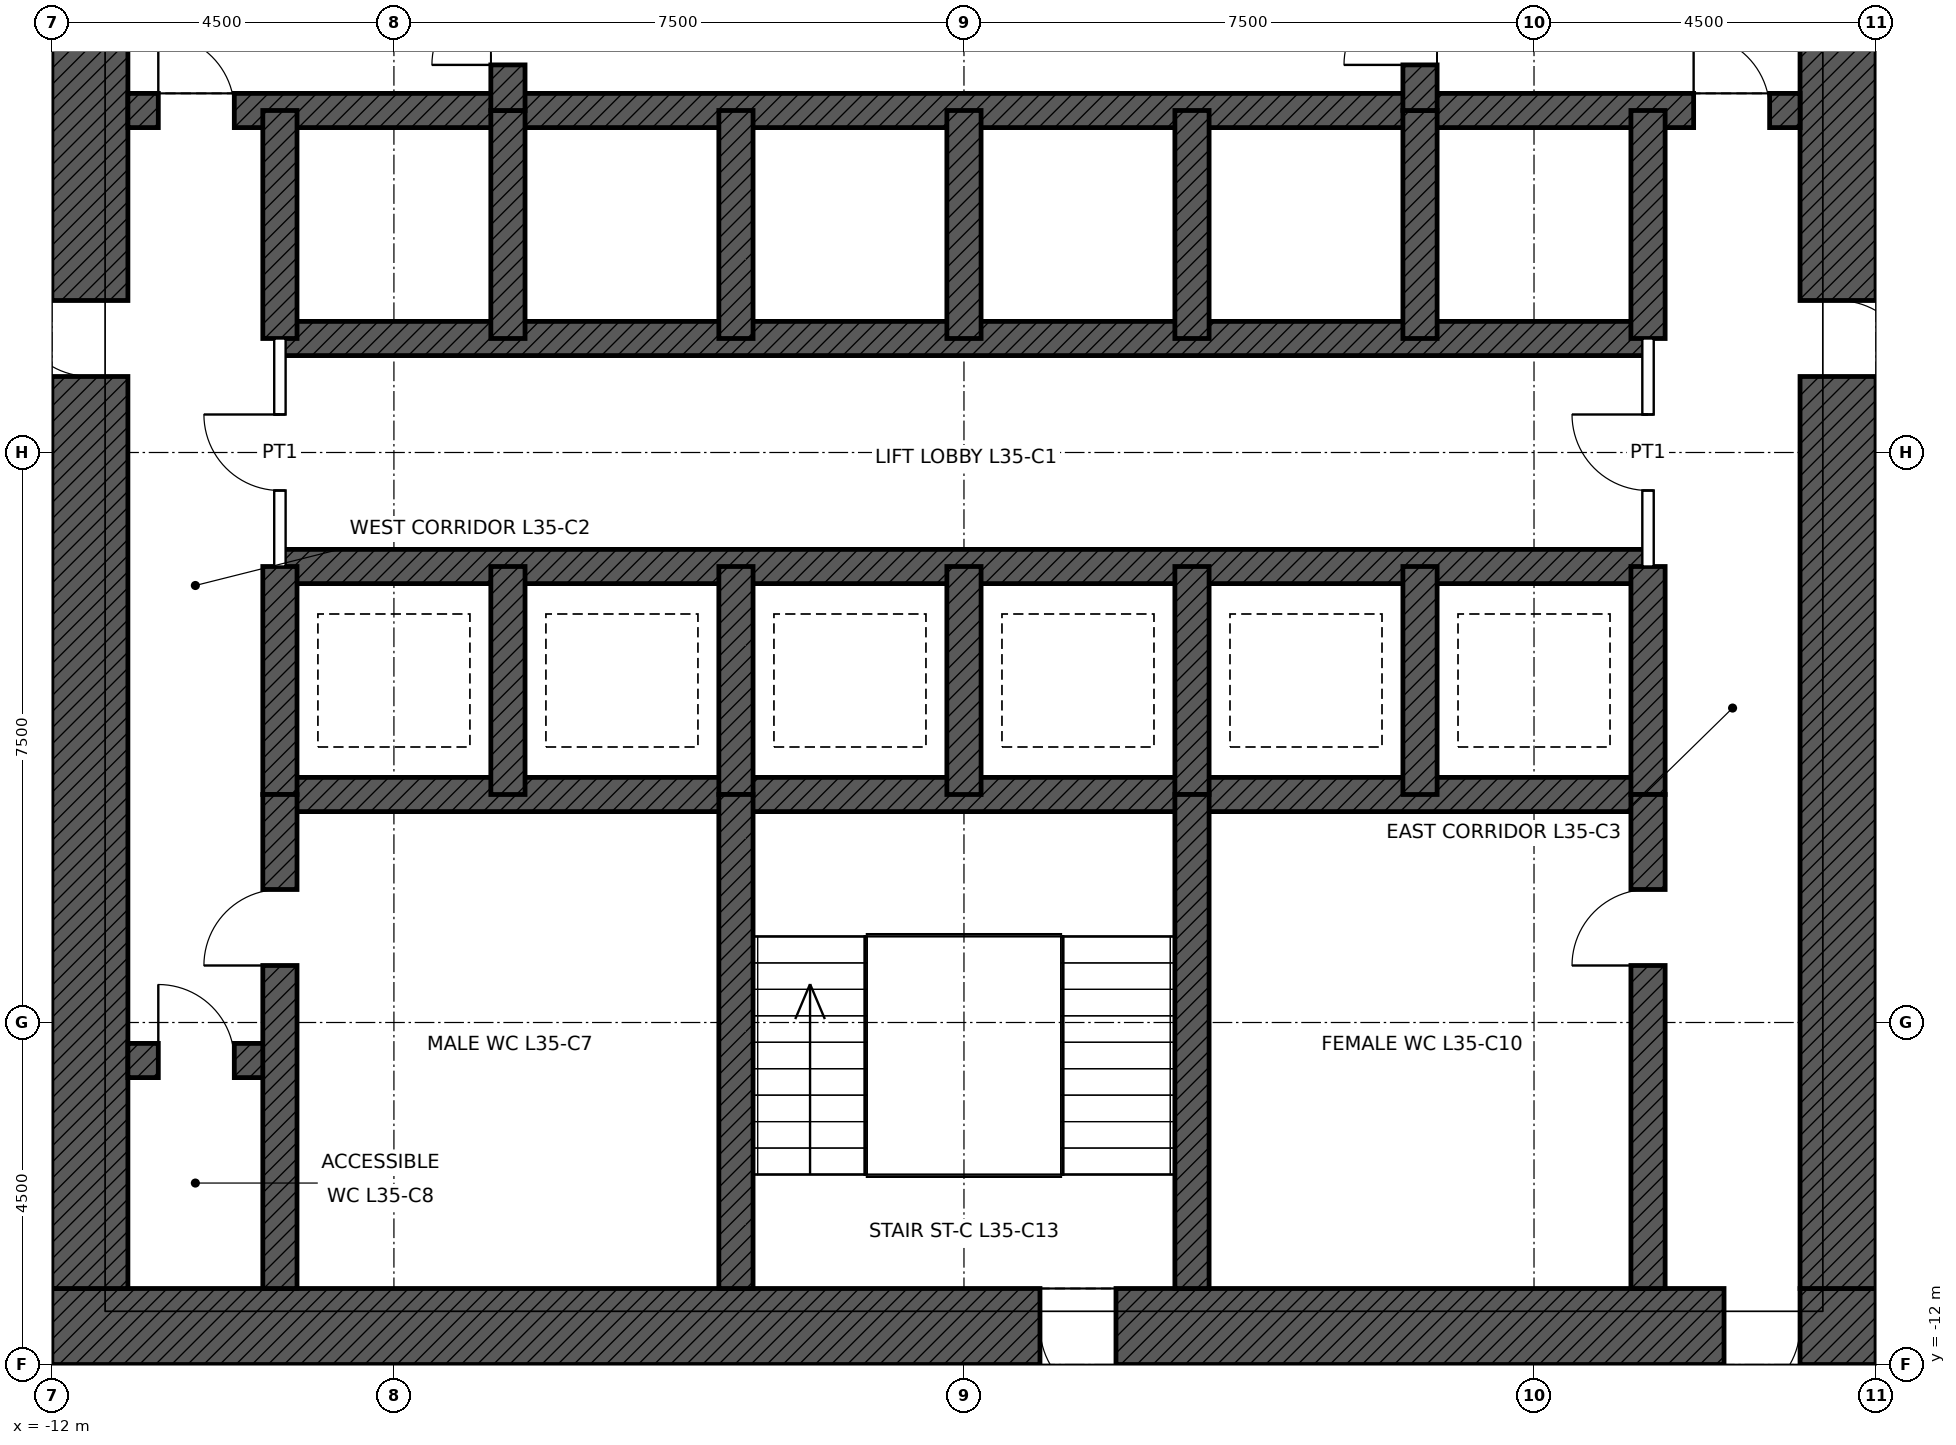
"""IFC4 building model, lengths in metres.
Left out: names, types, materials, properties, quantities, classifications, styles, units other than length and angle.
Written with IfcOpenShell. Run it as: python <this file> out.ifc"""

import sys

from ifc_helpers import new_model, si_unit, direction, frame, frame_2d, origin, place, context, subcontext, project, spatial, rectangle, extrude, element, fill, save


model = new_model("IFC4")
c1 = context("Model", 3, precision=1e-05, world=origin(), true_north=direction((0.0, 1.0)))
c2 = subcontext(c1, "Body", "Model", "MODEL_VIEW")
j1 = project(units=[si_unit("LENGTHUNIT", "METRE"), si_unit("PLANEANGLEUNIT", "RADIAN")], contexts=[c1])
p1 = place(None, origin())
s1 = spatial("IfcSite", under=j1, at=p1, CompositionType="ELEMENT")
p2 = place(p1, origin())
s2 = spatial("IfcBuilding", under=s1, at=p2, CompositionType="ELEMENT")
p3 = place(p2, frame((0.0, 0.0, 171.9)))
s3 = spatial("IfcBuildingStorey", under=s2, at=p3, CompositionType="ELEMENT", Elevation=171.9)
p4 = place(p3, frame((12.0, -11.5, 0.0), z_axis=(0.0, 0.0, 1.0), x_axis=(-1.0, 0.0, 0.0)))
e1 = element("IfcWall", 1, at=p4, inside=s3, PredefinedType="SHEAR", context=c2, shape_type="SweptSolid", body=[
    extrude(rectangle(XDim=24.0, YDim=1.0, at=frame_2d((12.0, 0.0))), origin(), (0.0, 0.0, 1.0), 6.0),
])
p5 = place(p4, frame((10.0, 0.0, 0.0)))
e2 = element("IfcOpeningElement", 2, at=p5, cuts=e1, PredefinedType="OPENING", context=c2, shape_type="SweptSolid", body=[
    extrude(rectangle(XDim=1.0, YDim=2.1, at=frame_2d((0.5, 1.05))), frame((0.0, 0.51, 0.0), z_axis=(0.0, -1.0, 0.0), x_axis=(1.0, 0.0, 0.0)), (0.0, 0.0, 1.0), 1.02),
])
p6 = place(p4, frame((1.0, 0.0, 0.0)))
e3 = element("IfcOpeningElement", 3, at=p6, cuts=e1, PredefinedType="OPENING", context=c2, shape_type="SweptSolid", body=[
    extrude(rectangle(XDim=1.0, YDim=2.4, at=frame_2d((0.5, 1.2))), frame((0.0, 0.51, 0.0), z_axis=(0.0, -1.0, 0.0), x_axis=(1.0, 0.0, 0.0)), (0.0, 0.0, 1.0), 1.02),
])
p7 = place(p3, frame((11.5, 11.0, 0.0), z_axis=(0.0, 0.0, 1.0), x_axis=(0.0, -1.0, 0.0)))
e4 = element("IfcWall", 4, at=p7, inside=s3, PredefinedType="SHEAR", context=c2, shape_type="SweptSolid", body=[
    extrude(rectangle(XDim=22.0, YDim=1.0, at=frame_2d((11.0, 0.0))), origin(), (0.0, 0.0, 1.0), 6.0),
])
p8 = place(p7, frame((9.0, 0.0, 0.0)))
e5 = element("IfcOpeningElement", 5, at=p8, cuts=e4, PredefinedType="OPENING", context=c2, shape_type="SweptSolid", body=[
    extrude(rectangle(XDim=1.0, YDim=2.4, at=frame_2d((0.5, 1.2))), frame((0.0, 0.51, 0.0), z_axis=(0.0, -1.0, 0.0), x_axis=(1.0, 0.0, 0.0)), (0.0, 0.0, 1.0), 1.02),
])
p9 = place(p3, frame((-11.5, -11.0, 0.0), z_axis=(0.0, 0.0, 1.0), x_axis=(0.0, 1.0, 0.0)))
e6 = element("IfcWall", 6, at=p9, inside=s3, PredefinedType="SHEAR", context=c2, shape_type="SweptSolid", body=[
    extrude(rectangle(XDim=22.0, YDim=1.0, at=frame_2d((11.0, 0.0))), origin(), (0.0, 0.0, 1.0), 6.0),
])
p10 = place(p9, frame((12.0, 0.0, 0.0)))
e7 = element("IfcOpeningElement", 7, at=p10, cuts=e6, PredefinedType="OPENING", context=c2, shape_type="SweptSolid", body=[
    extrude(rectangle(XDim=1.0, YDim=2.4, at=frame_2d((0.5, 1.2))), frame((0.0, 0.51, 0.0), z_axis=(0.0, -1.0, 0.0), x_axis=(1.0, 0.0, 0.0)), (0.0, 0.0, 1.0), 1.02),
])
p11 = place(p3, frame((-11.0, 4.5, 0.0), z_axis=(0.0, 0.0, 1.0), x_axis=(1.0, 0.0, 0.0)))
e8 = element("IfcWall", 8, at=p11, inside=s3, PredefinedType="SHEAR", context=c2, shape_type="SweptSolid", body=[
    extrude(rectangle(XDim=22.0, YDim=0.45, at=frame_2d((11.0, 0.0))), origin(), (0.0, 0.0, 1.0), 6.0),
])
p12 = place(p11, frame((0.4, 0.0, 0.0)))
e9 = element("IfcOpeningElement", 9, at=p12, cuts=e8, PredefinedType="OPENING", context=c2, shape_type="SweptSolid", body=[
    extrude(rectangle(XDim=1.0, YDim=2.1, at=frame_2d((0.5, 1.05))), frame((0.0, 0.235, 0.0), z_axis=(0.0, -1.0, 0.0), x_axis=(1.0, 0.0, 0.0)), (0.0, 0.0, 1.0), 0.47),
])
p13 = place(p11, frame((20.6, 0.0, 0.0)))
e10 = element("IfcOpeningElement", 10, at=p13, cuts=e8, PredefinedType="OPENING", context=c2, shape_type="SweptSolid", body=[
    extrude(rectangle(XDim=1.0, YDim=2.1, at=frame_2d((0.5, 1.05))), frame((0.0, 0.235, 0.0), z_axis=(0.0, -1.0, 0.0), x_axis=(1.0, 0.0, 0.0)), (0.0, 0.0, 1.0), 0.47),
])
for number, where, z_axis, x_axis in (
    (11, (-9.0, 1.5, 0.0), (0.0, 0.0, 1.0), (1.0, 0.0, 0.0)),
    (12, (-9.0, -1.5, 0.0), (0.0, 0.0, 1.0), (1.0, 0.0, 0.0)),
    (13, (-9.0, -4.5, 0.0), (0.0, 0.0, 1.0), (1.0, 0.0, 0.0)),
):
    element("IfcWall", number, at=place(p3, frame(where, z_axis=z_axis, x_axis=x_axis)), inside=s3, PredefinedType="SHEAR", context=c2, shape_type="SweptSolid", body=[
        extrude(rectangle(XDim=18.0, YDim=0.45, at=frame_2d((9.0, 0.0))), origin(), (0.0, 0.0, 1.0), 6.0),
    ])
p14 = place(p3, frame((-11.0, -8.0, 0.0), z_axis=(0.0, 0.0, 1.0), x_axis=(1.0, 0.0, 0.0)))
e14 = element("IfcWall", 14, at=p14, inside=s3, PredefinedType="SHEAR", context=c2, shape_type="SweptSolid", body=[
    extrude(rectangle(XDim=2.0, YDim=0.45, at=frame_2d((1.0, 0.0))), origin(), (0.0, 0.0, 1.0), 6.0),
])
p15 = place(p14, frame((0.4, 0.0, 0.0)))
e15 = element("IfcOpeningElement", 15, at=p15, cuts=e14, PredefinedType="OPENING", context=c2, shape_type="SweptSolid", body=[
    extrude(rectangle(XDim=1.0, YDim=2.1, at=frame_2d((0.5, 1.05))), frame((0.0, 0.235, 0.0), z_axis=(0.0, -1.0, 0.0), x_axis=(1.0, 0.0, 0.0)), (0.0, 0.0, 1.0), 0.47),
])
for number, where, z_axis, x_axis in (
    (16, (-9.0, 1.5, 0.0), (0.0, 0.0, 1.0), (0.0, 1.0, 0.0)),
    (17, (9.0, 1.5, 0.0), (0.0, 0.0, 1.0), (0.0, 1.0, 0.0)),
    (18, (-9.0, -4.5, 0.0), (0.0, 0.0, 1.0), (0.0, 1.0, 0.0)),
    (19, (9.0, -4.5, 0.0), (0.0, 0.0, 1.0), (0.0, 1.0, 0.0)),
    (20, (-6.0, 1.5, 0.0), (0.0, 0.0, 1.0), (0.0, 1.0, 0.0)),
    (21, (-3.0, 1.5, 0.0), (0.0, 0.0, 1.0), (0.0, 1.0, 0.0)),
    (22, (0.0, 1.5, 0.0), (0.0, 0.0, 1.0), (0.0, 1.0, 0.0)),
    (23, (3.0, 1.5, 0.0), (0.0, 0.0, 1.0), (0.0, 1.0, 0.0)),
    (24, (6.0, 1.5, 0.0), (0.0, 0.0, 1.0), (0.0, 1.0, 0.0)),
    (25, (-6.0, -4.5, 0.0), (0.0, 0.0, 1.0), (0.0, 1.0, 0.0)),
    (26, (-3.0, -4.5, 0.0), (0.0, 0.0, 1.0), (0.0, 1.0, 0.0)),
    (27, (0.0, -4.5, 0.0), (0.0, 0.0, 1.0), (0.0, 1.0, 0.0)),
    (28, (3.0, -4.5, 0.0), (0.0, 0.0, 1.0), (0.0, 1.0, 0.0)),
    (29, (6.0, -4.5, 0.0), (0.0, 0.0, 1.0), (0.0, 1.0, 0.0)),
):
    element("IfcWall", number, at=place(p3, frame(where, z_axis=z_axis, x_axis=x_axis)), inside=s3, PredefinedType="SHEAR", context=c2, shape_type="SweptSolid", body=[
        extrude(rectangle(XDim=3.0, YDim=0.45, at=frame_2d((1.5, 0.0))), origin(), (0.0, 0.0, 1.0), 6.0),
    ])
p16 = place(p3, frame((-6.0, 4.5, 0.0), z_axis=(0.0, 0.0, 1.0), x_axis=(0.0, 1.0, 0.0)))
e30 = element("IfcWall", 30, at=p16, inside=s3, PredefinedType="SHEAR", context=c2, shape_type="SweptSolid", body=[
    extrude(rectangle(XDim=6.5, YDim=0.45, at=frame_2d((3.25, 0.0))), origin(), (0.0, 0.0, 1.0), 6.0),
])
p17 = place(p16, frame((0.6, 0.0, 0.0)))
e31 = element("IfcOpeningElement", 31, at=p17, cuts=e30, PredefinedType="OPENING", context=c2, shape_type="SweptSolid", body=[
    extrude(rectangle(XDim=1.0, YDim=2.1, at=frame_2d((0.5, 1.05))), frame((0.0, 0.235, 0.0), z_axis=(0.0, -1.0, 0.0), x_axis=(1.0, 0.0, 0.0)), (0.0, 0.0, 1.0), 0.47),
])
p18 = place(p3, frame((6.0, 4.5, 0.0), z_axis=(0.0, 0.0, 1.0), x_axis=(0.0, 1.0, 0.0)))
e32 = element("IfcWall", 32, at=p18, inside=s3, PredefinedType="SHEAR", context=c2, shape_type="SweptSolid", body=[
    extrude(rectangle(XDim=6.5, YDim=0.45, at=frame_2d((3.25, 0.0))), origin(), (0.0, 0.0, 1.0), 6.0),
])
p19 = place(p18, frame((0.6, 0.0, 0.0)))
e33 = element("IfcOpeningElement", 33, at=p19, cuts=e32, PredefinedType="OPENING", context=c2, shape_type="SweptSolid", body=[
    extrude(rectangle(XDim=1.0, YDim=2.1, at=frame_2d((0.5, 1.05))), frame((0.0, 0.235, 0.0), z_axis=(0.0, -1.0, 0.0), x_axis=(1.0, 0.0, 0.0)), (0.0, 0.0, 1.0), 0.47),
])
p20 = place(p3, frame((-9.0, -11.0, 0.0), z_axis=(0.0, 0.0, 1.0), x_axis=(0.0, 1.0, 0.0)))
e34 = element("IfcWall", 34, at=p20, inside=s3, PredefinedType="SHEAR", context=c2, shape_type="SweptSolid", body=[
    extrude(rectangle(XDim=6.5, YDim=0.45, at=frame_2d((3.25, 0.0))), origin(), (0.0, 0.0, 1.0), 6.0),
])
p21 = place(p20, frame((4.25, 0.0, 0.0)))
e35 = element("IfcOpeningElement", 35, at=p21, cuts=e34, PredefinedType="OPENING", context=c2, shape_type="SweptSolid", body=[
    extrude(rectangle(XDim=1.0, YDim=2.1, at=frame_2d((0.5, 1.05))), frame((0.0, 0.235, 0.0), z_axis=(0.0, -1.0, 0.0), x_axis=(1.0, 0.0, 0.0)), (0.0, 0.0, 1.0), 0.47),
])
p22 = place(p3, frame((9.0, -11.0, 0.0), z_axis=(0.0, 0.0, 1.0), x_axis=(0.0, 1.0, 0.0)))
e36 = element("IfcWall", 36, at=p22, inside=s3, PredefinedType="SHEAR", context=c2, shape_type="SweptSolid", body=[
    extrude(rectangle(XDim=6.5, YDim=0.45, at=frame_2d((3.25, 0.0))), origin(), (0.0, 0.0, 1.0), 6.0),
])
p23 = place(p22, frame((4.25, 0.0, 0.0)))
e37 = element("IfcOpeningElement", 37, at=p23, cuts=e36, PredefinedType="OPENING", context=c2, shape_type="SweptSolid", body=[
    extrude(rectangle(XDim=1.0, YDim=2.1, at=frame_2d((0.5, 1.05))), frame((0.0, 0.235, 0.0), z_axis=(0.0, -1.0, 0.0), x_axis=(1.0, 0.0, 0.0)), (0.0, 0.0, 1.0), 0.47),
])
for number, where, z_axis, x_axis in (
    (38, (-3.0, -11.0, 0.0), (0.0, 0.0, 1.0), (0.0, 1.0, 0.0)),
    (39, (3.0, -11.0, 0.0), (0.0, 0.0, 1.0), (0.0, 1.0, 0.0)),
):
    element("IfcWall", number, at=place(p3, frame(where, z_axis=z_axis, x_axis=x_axis)), inside=s3, PredefinedType="SHEAR", context=c2, shape_type="SweptSolid", body=[
        extrude(rectangle(XDim=6.5, YDim=0.45, at=frame_2d((3.25, 0.0))), origin(), (0.0, 0.0, 1.0), 6.0),
    ])
p24 = place(p3, frame((12.0, -10.0, 0.0), z_axis=(0.0, 0.0, 1.0), x_axis=(1.0, 0.0, 0.0)))
e40 = element("IfcWall", 40, at=p24, inside=s3, PredefinedType="PARTITIONING", context=c2, shape_type="SweptSolid", body=[
    extrude(rectangle(XDim=10.05, YDim=0.15, at=frame_2d((5.025, 0.0))), origin(), (0.0, 0.0, 1.0), 5.85),
])
p25 = place(p3, frame((-9.0, -1.5, 0.0), z_axis=(0.0, 0.0, 1.0), x_axis=(0.0, 1.0, 0.0)))
e41 = element("IfcWall", 41, at=p25, inside=s3, PredefinedType="PARTITIONING", context=c2, shape_type="SweptSolid", body=[
    extrude(rectangle(XDim=3.0, YDim=0.15, at=frame_2d((1.5, 0.0))), origin(), (0.0, 0.0, 1.0), 5.75),
])
p26 = place(p25, frame((1.0, 0.0, 0.0)))
e42 = element("IfcOpeningElement", 42, at=p26, cuts=e41, PredefinedType="OPENING", context=c2, shape_type="SweptSolid", body=[
    extrude(rectangle(XDim=1.0, YDim=2.4, at=frame_2d((0.5, 1.2))), frame((0.0, 0.085, 0.0), z_axis=(0.0, -1.0, 0.0), x_axis=(1.0, 0.0, 0.0)), (0.0, 0.0, 1.0), 0.17),
])
p27 = place(p3, frame((9.0, -1.5, 0.0), z_axis=(0.0, 0.0, 1.0), x_axis=(0.0, 1.0, 0.0)))
e43 = element("IfcWall", 43, at=p27, inside=s3, PredefinedType="PARTITIONING", context=c2, shape_type="SweptSolid", body=[
    extrude(rectangle(XDim=3.0, YDim=0.15, at=frame_2d((1.5, 0.0))), origin(), (0.0, 0.0, 1.0), 5.75),
])
p28 = place(p27, frame((1.0, 0.0, 0.0)))
e44 = element("IfcOpeningElement", 44, at=p28, cuts=e43, PredefinedType="OPENING", context=c2, shape_type="SweptSolid", body=[
    extrude(rectangle(XDim=1.0, YDim=2.4, at=frame_2d((0.5, 1.2))), frame((0.0, 0.085, 0.0), z_axis=(0.0, -1.0, 0.0), x_axis=(1.0, 0.0, 0.0)), (0.0, 0.0, 1.0), 0.17),
])
p29 = place(p12, origin())
e45 = element("IfcDoor", 45, at=p29, inside=s3, OperationType="SINGLE_SWING_LEFT", PredefinedType="DOOR", context=c2, shape_type="SweptSolid", body=[
    extrude(rectangle(XDim=1.0, YDim=2.1, at=frame_2d((0.5, 1.05))), frame((0.0, 0.025, 0.0), z_axis=(0.0, -1.0, 0.0), x_axis=(1.0, 0.0, 0.0)), (0.0, 0.0, 1.0), 0.05),
])
fill(e9, e45)
p30 = place(p13, origin())
e46 = element("IfcDoor", 46, at=p30, inside=s3, OperationType="SINGLE_SWING_LEFT", PredefinedType="DOOR", context=c2, shape_type="SweptSolid", body=[
    extrude(rectangle(XDim=1.0, YDim=2.1, at=frame_2d((0.5, 1.05))), frame((0.0, 0.025, 0.0), z_axis=(0.0, -1.0, 0.0), x_axis=(1.0, 0.0, 0.0)), (0.0, 0.0, 1.0), 0.05),
])
fill(e10, e46)
p31 = place(p17, origin())
e47 = element("IfcDoor", 47, at=p31, inside=s3, OperationType="SINGLE_SWING_LEFT", PredefinedType="DOOR", context=c2, shape_type="SweptSolid", body=[
    extrude(rectangle(XDim=1.0, YDim=2.1, at=frame_2d((0.5, 1.05))), frame((0.0, 0.025, 0.0), z_axis=(0.0, -1.0, 0.0), x_axis=(1.0, 0.0, 0.0)), (0.0, 0.0, 1.0), 0.05),
])
fill(e31, e47)
p32 = place(p19, origin())
e48 = element("IfcDoor", 48, at=p32, inside=s3, OperationType="SINGLE_SWING_LEFT", PredefinedType="DOOR", context=c2, shape_type="SweptSolid", body=[
    extrude(rectangle(XDim=1.0, YDim=2.1, at=frame_2d((0.5, 1.05))), frame((0.0, 0.025, 0.0), z_axis=(0.0, -1.0, 0.0), x_axis=(1.0, 0.0, 0.0)), (0.0, 0.0, 1.0), 0.05),
])
fill(e33, e48)
p33 = place(p5, origin())
e49 = element("IfcDoor", 49, at=p33, inside=s3, OperationType="SINGLE_SWING_LEFT", PredefinedType="DOOR", context=c2, shape_type="SweptSolid", body=[
    extrude(rectangle(XDim=1.0, YDim=2.1, at=frame_2d((0.5, 1.05))), frame((0.0, 0.485, 0.0), z_axis=(0.0, -1.0, 0.0), x_axis=(1.0, 0.0, 0.0)), (0.0, 0.0, 1.0), 0.05),
])
fill(e2, e49)
p34 = place(p8, origin())
e50 = element("IfcDoor", 50, at=p34, inside=s3, OperationType="SINGLE_SWING_RIGHT", PredefinedType="DOOR", context=c2, shape_type="SweptSolid", body=[
    extrude(rectangle(XDim=1.0, YDim=2.4, at=frame_2d((0.5, 1.2))), frame((0.0, 0.485, 0.0), z_axis=(0.0, -1.0, 0.0), x_axis=(1.0, 0.0, 0.0)), (0.0, 0.0, 1.0), 0.05),
])
fill(e5, e50)
p35 = place(p10, origin())
e51 = element("IfcDoor", 51, at=p35, inside=s3, OperationType="SINGLE_SWING_RIGHT", PredefinedType="DOOR", context=c2, shape_type="SweptSolid", body=[
    extrude(rectangle(XDim=1.0, YDim=2.4, at=frame_2d((0.5, 1.2))), frame((0.0, 0.485, 0.0), z_axis=(0.0, -1.0, 0.0), x_axis=(1.0, 0.0, 0.0)), (0.0, 0.0, 1.0), 0.05),
])
fill(e7, e51)
p36 = place(p6, origin())
e52 = element("IfcDoor", 52, at=p36, inside=s3, OperationType="SINGLE_SWING_RIGHT", PredefinedType="DOOR", context=c2, shape_type="SweptSolid", body=[
    extrude(rectangle(XDim=1.0, YDim=2.4, at=frame_2d((0.5, 1.2))), frame((0.0, 0.485, 0.0), z_axis=(0.0, -1.0, 0.0), x_axis=(1.0, 0.0, 0.0)), (0.0, 0.0, 1.0), 0.05),
])
fill(e3, e52)
p37 = place(p21, origin())
e53 = element("IfcDoor", 53, at=p37, inside=s3, OperationType="SINGLE_SWING_LEFT", PredefinedType="DOOR", context=c2, shape_type="SweptSolid", body=[
    extrude(rectangle(XDim=1.0, YDim=2.1, at=frame_2d((0.5, 1.05))), frame((0.0, 0.025, 0.0), z_axis=(0.0, -1.0, 0.0), x_axis=(1.0, 0.0, 0.0)), (0.0, 0.0, 1.0), 0.05),
])
fill(e35, e53)
p38 = place(p23, origin())
e54 = element("IfcDoor", 54, at=p38, inside=s3, OperationType="SINGLE_SWING_LEFT", PredefinedType="DOOR", context=c2, shape_type="SweptSolid", body=[
    extrude(rectangle(XDim=1.0, YDim=2.1, at=frame_2d((0.5, 1.05))), frame((0.0, 0.025, 0.0), z_axis=(0.0, -1.0, 0.0), x_axis=(1.0, 0.0, 0.0)), (0.0, 0.0, 1.0), 0.05),
])
fill(e37, e54)
p39 = place(p15, origin())
e55 = element("IfcDoor", 55, at=p39, inside=s3, OperationType="SINGLE_SWING_LEFT", PredefinedType="DOOR", context=c2, shape_type="SweptSolid", body=[
    extrude(rectangle(XDim=1.0, YDim=2.1, at=frame_2d((0.5, 1.05))), frame((0.0, 0.025, 0.0), z_axis=(0.0, -1.0, 0.0), x_axis=(1.0, 0.0, 0.0)), (0.0, 0.0, 1.0), 0.05),
])
fill(e15, e55)
p40 = place(p26, origin())
e56 = element("IfcDoor", 56, at=p40, inside=s3, OperationType="SINGLE_SWING_RIGHT", PredefinedType="DOOR", context=c2, shape_type="SweptSolid", body=[
    extrude(rectangle(XDim=1.0, YDim=2.4, at=frame_2d((0.5, 1.2))), frame((0.0, 0.025, 0.0), z_axis=(0.0, -1.0, 0.0), x_axis=(1.0, 0.0, 0.0)), (0.0, 0.0, 1.0), 0.05),
])
fill(e42, e56)
p41 = place(p28, origin())
e57 = element("IfcDoor", 57, at=p41, inside=s3, OperationType="SINGLE_SWING_RIGHT", PredefinedType="DOOR", context=c2, shape_type="SweptSolid", body=[
    extrude(rectangle(XDim=1.0, YDim=2.4, at=frame_2d((0.5, 1.2))), frame((0.0, 0.025, 0.0), z_axis=(0.0, -1.0, 0.0), x_axis=(1.0, 0.0, 0.0)), (0.0, 0.0, 1.0), 0.05),
])
fill(e44, e57)
save(model, sys.argv[1])
